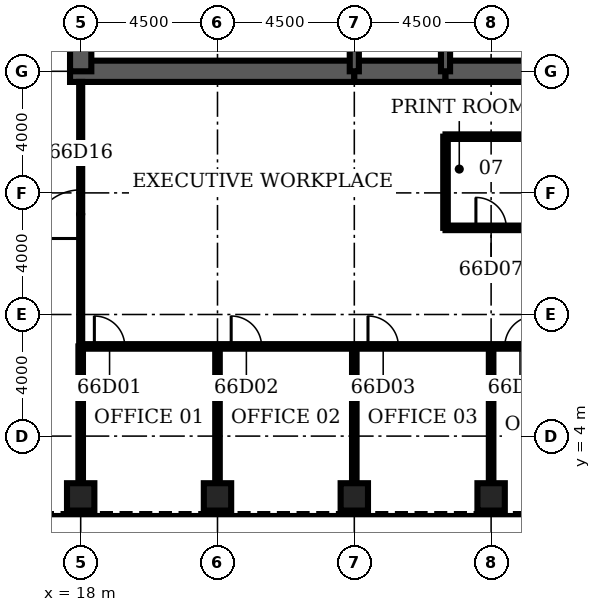
"""IFC4 building model, lengths in metres.
Left out: names, types, materials, properties, quantities, classifications, styles, units other than length and angle.
Written with IfcOpenShell. Run it as: python <this file> out.ifc"""

import sys

from ifc_helpers import new_model, si_unit, direction, frame, frame_2d, origin, origin_2d, place, context, subcontext, project, spatial, rectangle, hollow_rectangle, extrude, element, fill, save


model = new_model("IFC4")
c1 = context("Model", 3, precision=1e-05, world=origin(), true_north=direction((0.0, 1.0)))
c2 = subcontext(c1, "Body", "Model", "MODEL_VIEW")
j1 = project(units=[si_unit("LENGTHUNIT", "METRE"), si_unit("PLANEANGLEUNIT", "RADIAN")], contexts=[c1])
p1 = place(None, origin())
s1 = spatial("IfcSite", under=j1, at=p1, CompositionType="ELEMENT")
p2 = place(p1, origin())
s2 = spatial("IfcBuilding", under=s1, at=p2, CompositionType="ELEMENT")
p3 = place(p2, frame((0.0, 0.0, 292.1)))
s3 = spatial("IfcBuildingStorey", under=s2, at=p3, CompositionType="ELEMENT", Elevation=292.1)
for number, where, z_axis, x_axis in (
    (1, (18.0, 2.0, 0.0), (0.0, 0.0, 1.0), (0.0, 1.0, 0.0)),
    (2, (22.5, 2.0, 0.0), (0.0, 0.0, 1.0), (0.0, 1.0, 0.0)),
    (3, (27.0, 2.0, 0.0), (0.0, 0.0, 1.0), (0.0, 1.0, 0.0)),
    (4, (31.5, 2.0, 0.0), (0.0, 0.0, 1.0), (0.0, 1.0, 0.0)),
):
    element("IfcColumn", number, at=place(p3, frame(where, z_axis=z_axis, x_axis=x_axis)), inside=s3, PredefinedType="COLUMN", context=c2, shape_type="SweptSolid", body=[
        extrude(hollow_rectangle(XDim=0.9, YDim=0.9, WallThickness=0.06, at=origin_2d()), origin(), (0.0, 0.0, 1.0), 4.2),
    ])
p4 = place(p3, frame((17.65, 16.0, 0.0), z_axis=(0.0, 0.0, 1.0), x_axis=(1.0, 0.0, 0.0)))
e5 = element("IfcWall", 5, at=p4, inside=s3, PredefinedType="SHEAR", context=c2, shape_type="SweptSolid", body=[
    extrude(rectangle(XDim=9.35, YDim=0.7, at=frame_2d((4.675, 0.0))), origin(), (0.0, 0.0, 1.0), 4.2),
])
for number, where, z_axis, x_axis in (
    (6, (27.0, 16.0, 0.0), (0.0, 0.0, 1.0), (1.0, 0.0, 0.0)),
    (7, (30.0, 16.0, 0.0), (0.0, 0.0, 1.0), (1.0, 0.0, 0.0)),
):
    element("IfcWall", number, at=place(p3, frame(where, z_axis=z_axis, x_axis=x_axis)), inside=s3, PredefinedType="SHEAR", context=c2, shape_type="SweptSolid", body=[
        extrude(rectangle(XDim=3.0, YDim=0.7, at=frame_2d((1.5, 0.0))), origin(), (0.0, 0.0, 1.0), 4.2),
    ])
p5 = place(p3, frame((18.0, 19.2, 0.0), z_axis=(0.0, 0.0, 1.0), x_axis=(0.0, -1.0, 0.0)))
e8 = element("IfcWall", 8, at=p5, inside=s3, PredefinedType="SHEAR", context=c2, shape_type="SweptSolid", body=[
    extrude(rectangle(XDim=3.2, YDim=0.7, at=frame_2d((1.6, 0.0))), origin(), (0.0, 0.0, 1.0), 4.2),
])
for number, where, z_axis, x_axis in (
    (9, (27.0, 16.0, 0.0), (0.0, 0.0, 1.0), (0.0, 1.0, 0.0)),
    (10, (30.0, 16.0, 0.0), (0.0, 0.0, 1.0), (0.0, 1.0, 0.0)),
):
    element("IfcWall", number, at=place(p3, frame(where, z_axis=z_axis, x_axis=x_axis)), inside=s3, PredefinedType="SOLIDWALL", context=c2, shape_type="SweptSolid", body=[
        extrude(rectangle(XDim=3.2, YDim=0.3, at=frame_2d((1.6, 0.0))), origin(), (0.0, 0.0, 1.0), 4.2),
    ])
p6 = place(p3, frame((18.0, 6.95, 0.0), z_axis=(0.0, 0.0, 1.0), x_axis=(1.0, 0.0, 0.0)))
e11 = element("IfcWall", 11, at=p6, inside=s3, PredefinedType="PARTITIONING", context=c2, shape_type="SweptSolid", body=[
    extrude(rectangle(XDim=27.0, YDim=0.15, at=frame_2d((13.5, 0.0))), origin(), (0.0, 0.0, 1.0), 3.0),
])
p7 = place(p6, frame((0.45, 0.0, 0.0)))
e12 = element("IfcOpeningElement", 12, at=p7, cuts=e11, PredefinedType="OPENING", context=c2, shape_type="SweptSolid", body=[
    extrude(rectangle(XDim=1.0, YDim=2.1, at=frame_2d((0.5, 1.05))), frame((0.0, 0.085, 0.0), z_axis=(0.0, -1.0, 0.0), x_axis=(1.0, 0.0, 0.0)), (0.0, 0.0, 1.0), 0.17),
])
p8 = place(p6, frame((4.95, 0.0, 0.0)))
e13 = element("IfcOpeningElement", 13, at=p8, cuts=e11, PredefinedType="OPENING", context=c2, shape_type="SweptSolid", body=[
    extrude(rectangle(XDim=1.0, YDim=2.1, at=frame_2d((0.5, 1.05))), frame((0.0, 0.085, 0.0), z_axis=(0.0, -1.0, 0.0), x_axis=(1.0, 0.0, 0.0)), (0.0, 0.0, 1.0), 0.17),
])
p9 = place(p6, frame((9.45, 0.0, 0.0)))
e14 = element("IfcOpeningElement", 14, at=p9, cuts=e11, PredefinedType="OPENING", context=c2, shape_type="SweptSolid", body=[
    extrude(rectangle(XDim=1.0, YDim=2.1, at=frame_2d((0.5, 1.05))), frame((0.0, 0.085, 0.0), z_axis=(0.0, -1.0, 0.0), x_axis=(1.0, 0.0, 0.0)), (0.0, 0.0, 1.0), 0.17),
])
p10 = place(p6, frame((13.95, 0.0, 0.0)))
e15 = element("IfcOpeningElement", 15, at=p10, cuts=e11, PredefinedType="OPENING", context=c2, shape_type="SweptSolid", body=[
    extrude(rectangle(XDim=1.0, YDim=2.1, at=frame_2d((0.5, 1.05))), frame((0.0, 0.085, 0.0), z_axis=(0.0, -1.0, 0.0), x_axis=(1.0, 0.0, 0.0)), (0.0, 0.0, 1.0), 0.17),
])
p11 = place(p6, frame((18.45, 0.0, 0.0)))
e16 = element("IfcOpeningElement", 16, at=p11, cuts=e11, PredefinedType="OPENING", context=c2, shape_type="SweptSolid", body=[
    extrude(rectangle(XDim=1.0, YDim=2.1, at=frame_2d((0.5, 1.05))), frame((0.0, 0.085, 0.0), z_axis=(0.0, -1.0, 0.0), x_axis=(1.0, 0.0, 0.0)), (0.0, 0.0, 1.0), 0.17),
])
p12 = place(p6, frame((22.95, 0.0, 0.0)))
e17 = element("IfcOpeningElement", 17, at=p12, cuts=e11, PredefinedType="OPENING", context=c2, shape_type="SweptSolid", body=[
    extrude(rectangle(XDim=1.0, YDim=2.1, at=frame_2d((0.5, 1.05))), frame((0.0, 0.085, 0.0), z_axis=(0.0, -1.0, 0.0), x_axis=(1.0, 0.0, 0.0)), (0.0, 0.0, 1.0), 0.17),
])
p13 = place(p3, frame((30.0, 10.85, 0.0), z_axis=(0.0, 0.0, 1.0), x_axis=(1.0, 0.0, 0.0)))
e18 = element("IfcWall", 18, at=p13, inside=s3, PredefinedType="PARTITIONING", context=c2, shape_type="SweptSolid", body=[
    extrude(rectangle(XDim=3.0, YDim=0.15, at=frame_2d((1.5, 0.0))), origin(), (0.0, 0.0, 1.0), 3.0),
])
p14 = place(p13, frame((1.0, 0.0, 0.0)))
e19 = element("IfcOpeningElement", 19, at=p14, cuts=e18, PredefinedType="OPENING", context=c2, shape_type="SweptSolid", body=[
    extrude(rectangle(XDim=1.0, YDim=2.1, at=frame_2d((0.5, 1.05))), frame((0.0, 0.085, 0.0), z_axis=(0.0, -1.0, 0.0), x_axis=(1.0, 0.0, 0.0)), (0.0, 0.0, 1.0), 0.17),
])
p15 = place(p3, frame((30.0, 13.85, 0.0), z_axis=(0.0, 0.0, 1.0), x_axis=(1.0, 0.0, 0.0)))
e20 = element("IfcWall", 20, at=p15, inside=s3, PredefinedType="PARTITIONING", context=c2, shape_type="SweptSolid", body=[
    extrude(rectangle(XDim=3.0, YDim=0.15, at=frame_2d((1.5, 0.0))), origin(), (0.0, 0.0, 1.0), 3.0),
])
p16 = place(p3, frame((18.0, 2.45, 0.0), z_axis=(0.0, 0.0, 1.0), x_axis=(0.0, 1.0, 0.0)))
e21 = element("IfcWall", 21, at=p16, inside=s3, PredefinedType="PARTITIONING", context=c2, shape_type="SweptSolid", body=[
    extrude(rectangle(XDim=4.5, YDim=0.15, at=frame_2d((2.25, 0.0))), origin(), (0.0, 0.0, 1.0), 3.0),
])
p17 = place(p3, frame((18.0, 6.95, 0.0), z_axis=(0.0, 0.0, 1.0), x_axis=(0.0, 1.0, 0.0)))
e22 = element("IfcWall", 22, at=p17, inside=s3, PredefinedType="PARTITIONING", context=c2, shape_type="SweptSolid", body=[
    extrude(rectangle(XDim=8.7, YDim=0.1, at=frame_2d((4.35, 0.0))), origin(), (0.0, 0.0, 1.0), 3.0),
])
p18 = place(p17, frame((3.55, 0.0, 0.0)))
e23 = element("IfcOpeningElement", 23, at=p18, cuts=e22, PredefinedType="OPENING", context=c2, shape_type="SweptSolid", body=[
    extrude(rectangle(XDim=1.6, YDim=2.1, at=frame_2d((0.8, 1.05))), frame((0.0, 0.06, 0.0), z_axis=(0.0, -1.0, 0.0), x_axis=(1.0, 0.0, 0.0)), (0.0, 0.0, 1.0), 0.12),
])
for number, where, z_axis, x_axis in (
    (24, (22.5, 2.45, 0.0), (0.0, 0.0, 1.0), (0.0, 1.0, 0.0)),
    (25, (27.0, 2.45, 0.0), (0.0, 0.0, 1.0), (0.0, 1.0, 0.0)),
):
    element("IfcWall", number, at=place(p3, frame(where, z_axis=z_axis, x_axis=x_axis)), inside=s3, PredefinedType="PARTITIONING", context=c2, shape_type="SweptSolid", body=[
        extrude(rectangle(XDim=4.5, YDim=0.15, at=frame_2d((2.25, 0.0))), origin(), (0.0, 0.0, 1.0), 3.0),
    ])
p19 = place(p3, frame((30.0, 10.85, 0.0), z_axis=(0.0, 0.0, 1.0), x_axis=(0.0, 1.0, 0.0)))
e26 = element("IfcWall", 26, at=p19, inside=s3, PredefinedType="PARTITIONING", context=c2, shape_type="SweptSolid", body=[
    extrude(rectangle(XDim=3.0, YDim=0.15, at=frame_2d((1.5, 0.0))), origin(), (0.0, 0.0, 1.0), 3.0),
])
p20 = place(p3, frame((31.5, 2.45, 0.0), z_axis=(0.0, 0.0, 1.0), x_axis=(0.0, 1.0, 0.0)))
e27 = element("IfcWall", 27, at=p20, inside=s3, PredefinedType="PARTITIONING", context=c2, shape_type="SweptSolid", body=[
    extrude(rectangle(XDim=4.5, YDim=0.15, at=frame_2d((2.25, 0.0))), origin(), (0.0, 0.0, 1.0), 3.0),
])
p21 = place(p7, origin())
e28 = element("IfcDoor", 28, at=p21, inside=s3, OperationType="SINGLE_SWING_LEFT", PredefinedType="DOOR", context=c2, shape_type="SweptSolid", body=[
    extrude(rectangle(XDim=1.0, YDim=2.1, at=frame_2d((0.5, 1.05))), frame((0.0, 0.025, 0.0), z_axis=(0.0, -1.0, 0.0), x_axis=(1.0, 0.0, 0.0)), (0.0, 0.0, 1.0), 0.05),
])
fill(e12, e28)
p22 = place(p8, origin())
e29 = element("IfcDoor", 29, at=p22, inside=s3, OperationType="SINGLE_SWING_LEFT", PredefinedType="DOOR", context=c2, shape_type="SweptSolid", body=[
    extrude(rectangle(XDim=1.0, YDim=2.1, at=frame_2d((0.5, 1.05))), frame((0.0, 0.025, 0.0), z_axis=(0.0, -1.0, 0.0), x_axis=(1.0, 0.0, 0.0)), (0.0, 0.0, 1.0), 0.05),
])
fill(e13, e29)
p23 = place(p9, origin())
e30 = element("IfcDoor", 30, at=p23, inside=s3, OperationType="SINGLE_SWING_LEFT", PredefinedType="DOOR", context=c2, shape_type="SweptSolid", body=[
    extrude(rectangle(XDim=1.0, YDim=2.1, at=frame_2d((0.5, 1.05))), frame((0.0, 0.025, 0.0), z_axis=(0.0, -1.0, 0.0), x_axis=(1.0, 0.0, 0.0)), (0.0, 0.0, 1.0), 0.05),
])
fill(e14, e30)
p24 = place(p10, origin())
e31 = element("IfcDoor", 31, at=p24, inside=s3, OperationType="SINGLE_SWING_RIGHT", PredefinedType="DOOR", context=c2, shape_type="SweptSolid", body=[
    extrude(rectangle(XDim=1.0, YDim=2.1, at=frame_2d((0.5, 1.05))), frame((0.0, 0.025, 0.0), z_axis=(0.0, -1.0, 0.0), x_axis=(1.0, 0.0, 0.0)), (0.0, 0.0, 1.0), 0.05),
])
fill(e15, e31)
p25 = place(p14, origin())
e32 = element("IfcDoor", 32, at=p25, inside=s3, OperationType="SINGLE_SWING_LEFT", PredefinedType="DOOR", context=c2, shape_type="SweptSolid", body=[
    extrude(rectangle(XDim=1.0, YDim=2.1, at=frame_2d((0.5, 1.05))), frame((0.0, 0.025, 0.0), z_axis=(0.0, -1.0, 0.0), x_axis=(1.0, 0.0, 0.0)), (0.0, 0.0, 1.0), 0.05),
])
fill(e19, e32)
p26 = place(p18, origin())
e33 = element("IfcDoor", 33, at=p26, inside=s3, OperationType="SINGLE_SWING_LEFT", PredefinedType="DOOR", context=c2, shape_type="SweptSolid", body=[
    extrude(rectangle(XDim=1.6, YDim=2.1, at=frame_2d((0.8, 1.05))), frame((0.0, 0.025, 0.0), z_axis=(0.0, -1.0, 0.0), x_axis=(1.0, 0.0, 0.0)), (0.0, 0.0, 1.0), 0.05),
])
fill(e23, e33)
save(model, sys.argv[1])
